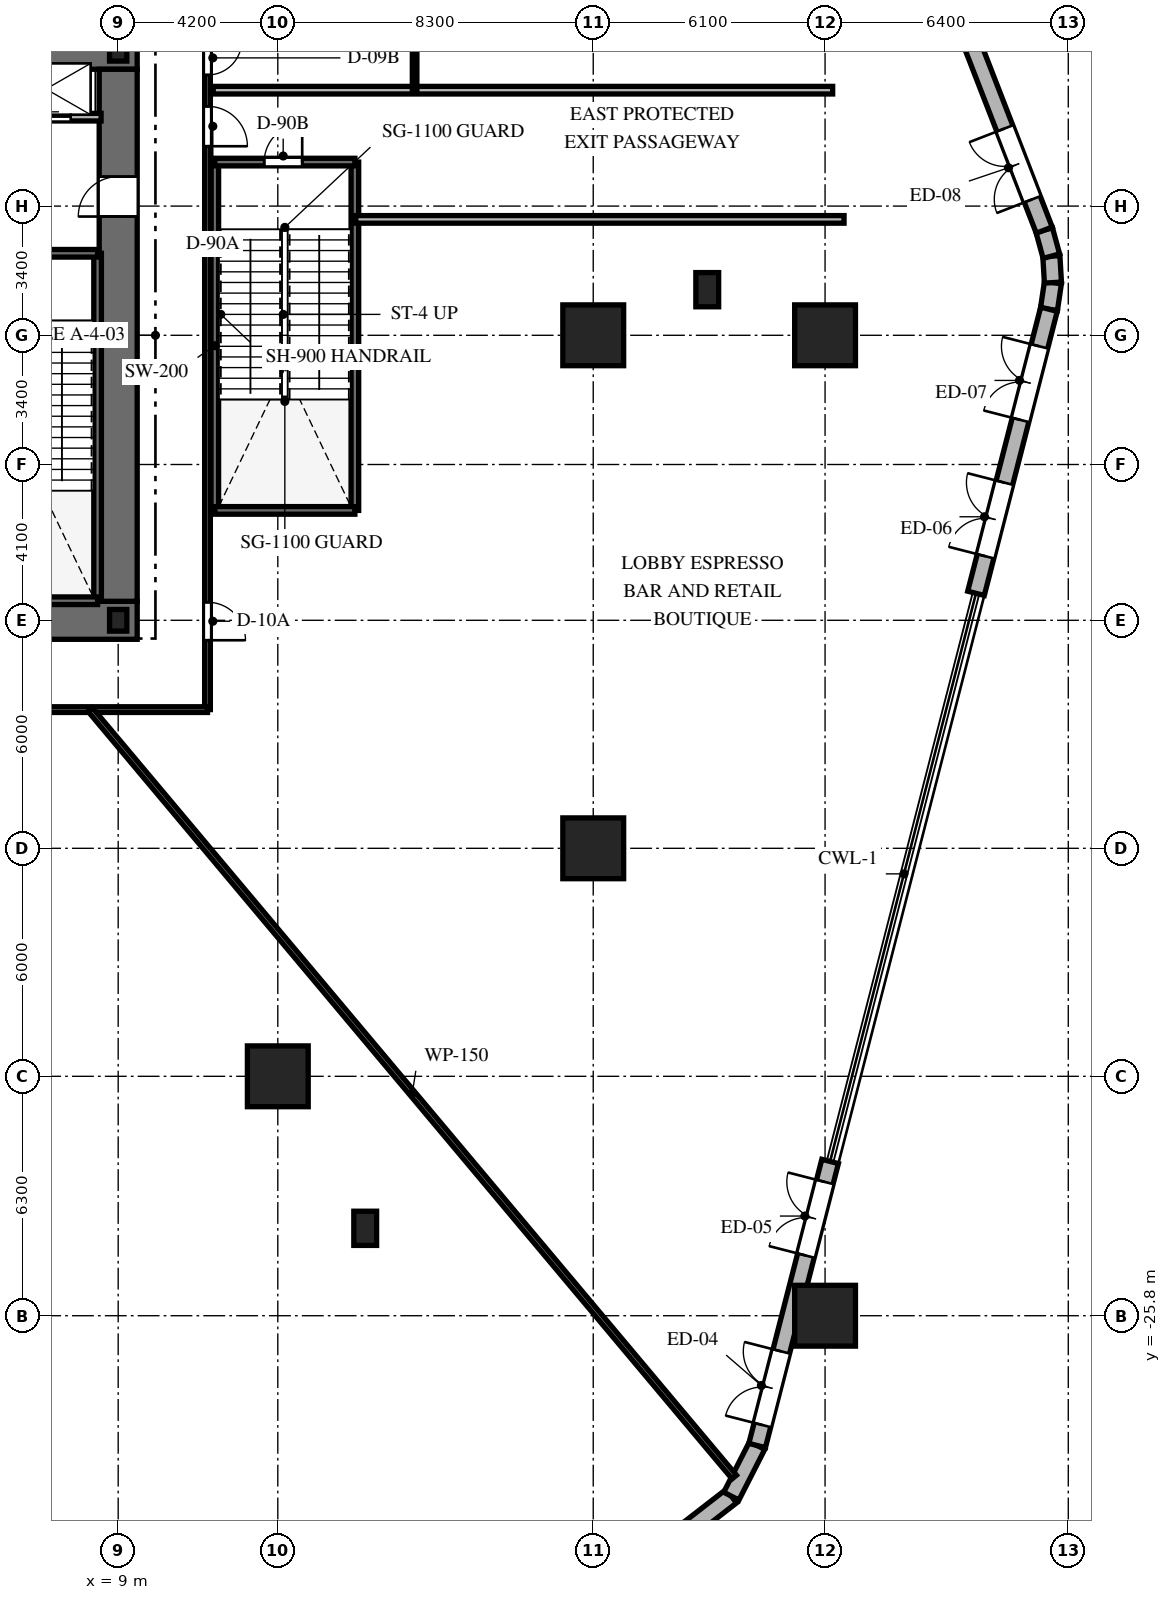
"""IFC4 building model, lengths in metres.
Left out: names, types, materials, properties, quantities, classifications, styles, units other than length and angle.
Written with IfcOpenShell. Run it as: python <this file> out.ifc"""

import sys

from ifc_helpers import new_model, si_unit, direction, frame, frame_2d, origin, origin_2d, place, context, subcontext, project, spatial, rectangle, i_section, extrude, element, fill, save


model = new_model("IFC4")
c1 = context("Model", 3, precision=1e-05, world=origin(), true_north=direction((0.0, 1.0)))
c2 = subcontext(c1, "Body", "Model", "MODEL_VIEW")
j1 = project(units=[si_unit("LENGTHUNIT", "METRE"), si_unit("PLANEANGLEUNIT", "RADIAN")], contexts=[c1])
p1 = place(None, origin())
s1 = spatial("IfcSite", under=j1, at=p1, CompositionType="ELEMENT")
p2 = place(p1, origin())
s2 = spatial("IfcBuilding", under=s1, at=p2, CompositionType="ELEMENT")
p3 = place(p2, origin())
s3 = spatial("IfcBuildingStorey", under=s2, at=p3, CompositionType="ELEMENT", Elevation=0.0)
p4 = place(p3, frame((-9.5, -7.5, 0.0), z_axis=(0.0, 0.0, 1.0), x_axis=(1.0, 0.0, 0.0)))
e1 = element("IfcWall", 1, at=p4, inside=s3, PredefinedType="SHEAR", context=c2, shape_type="SweptSolid", body=[
    extrude(rectangle(XDim=19.0, YDim=1.0, at=frame_2d((9.5, 0.0))), origin(), (0.0, 0.0, 1.0), 6.0),
])
p5 = place(p4, frame((9.55, 0.0, 0.0)))
e2 = element("IfcOpeningElement", 2, at=p5, cuts=e1, PredefinedType="OPENING", context=c2, shape_type="SweptSolid", body=[
    extrude(rectangle(XDim=1.0, YDim=2.15, at=frame_2d((0.5, 1.075))), frame((0.0, 0.51, 0.0), z_axis=(0.0, -1.0, 0.0), x_axis=(1.0, 0.0, 0.0)), (0.0, 0.0, 1.0), 1.02),
])
p6 = place(p3, frame((1.85, 7.5, 0.0), z_axis=(0.0, 0.0, 1.0), x_axis=(1.0, 0.0, 0.0)))
e3 = element("IfcWall", 3, at=p6, inside=s3, PredefinedType="SHEAR", context=c2, shape_type="SweptSolid", body=[
    extrude(rectangle(XDim=7.65, YDim=1.0, at=frame_2d((3.825, 0.0))), origin(), (0.0, 0.0, 1.0), 6.0),
])
p7 = place(p3, frame((9.0, -7.0, 0.0), z_axis=(0.0, 0.0, 1.0), x_axis=(0.0, 1.0, 0.0)))
e4 = element("IfcWall", 4, at=p7, inside=s3, PredefinedType="SHEAR", context=c2, shape_type="SweptSolid", body=[
    extrude(rectangle(XDim=14.0, YDim=1.0, at=frame_2d((7.0, 0.0))), origin(), (0.0, 0.0, 1.0), 6.0),
])
p8 = place(p7, frame((10.125, 0.0, 0.0)))
e5 = element("IfcOpeningElement", 5, at=p8, cuts=e4, PredefinedType="OPENING", context=c2, shape_type="SweptSolid", body=[
    extrude(rectangle(XDim=1.05, YDim=2.15, at=frame_2d((0.525, 1.075))), frame((0.0, 0.51, 0.0), z_axis=(0.0, -1.0, 0.0), x_axis=(1.0, 0.0, 0.0)), (0.0, 0.0, 1.0), 1.02),
])
p9 = place(p3, frame((8.458, -6.985, 0.0), z_axis=(0.0, 0.0, 1.0), x_axis=(0.0, 1.0, 0.0)))
e6 = element("IfcWall", 6, at=p9, inside=s3, PredefinedType="SHEAR", context=c2, shape_type="SweptSolid", body=[
    extrude(rectangle(XDim=9.143, YDim=0.2, at=frame_2d((4.572, 0.0))), origin(), (0.0, 0.0, 1.0), 6.0),
])
p10 = place(p3, frame((4.772, -6.985, 0.0), z_axis=(0.0, 0.0, 1.0), x_axis=(1.0, 0.0, 0.0)))
e7 = element("IfcWall", 7, at=p10, inside=s3, PredefinedType="SHEAR", context=c2, shape_type="SweptSolid", body=[
    extrude(rectangle(XDim=3.686, YDim=0.2, at=frame_2d((1.843, 0.0))), origin(), (0.0, 0.0, 1.0), 6.0),
])
p11 = place(p3, frame((4.772, 2.158, 0.0), z_axis=(0.0, 0.0, 1.0), x_axis=(1.0, 0.0, 0.0)))
e8 = element("IfcWall", 8, at=p11, inside=s3, PredefinedType="SHEAR", context=c2, shape_type="SweptSolid", body=[
    extrude(rectangle(XDim=3.686, YDim=0.2, at=frame_2d((1.843, 0.0))), origin(), (0.0, 0.0, 1.0), 6.0),
])
p12 = place(p11, frame((1.35, 0.0, 0.0)))
e9 = element("IfcOpeningElement", 9, at=p12, cuts=e8, PredefinedType="OPENING", context=c2, shape_type="SweptSolid", body=[
    extrude(rectangle(XDim=1.0, YDim=2.15, at=frame_2d((0.5, 1.075))), frame((0.0, 0.11, 0.0), z_axis=(0.0, -1.0, 0.0), x_axis=(1.0, 0.0, 0.0)), (0.0, 0.0, 1.0), 0.22),
])
for number, where, z_axis, x_axis in (
    (10, (11.542, -4.608, 0.0), (0.0, 0.0, 1.0), (0.0, 1.0, 0.0)),
    (11, (15.228, -4.608, 0.0), (0.0, 0.0, 1.0), (0.0, 1.0, 0.0)),
):
    element("IfcWall", number, at=place(p3, frame(where, z_axis=z_axis, x_axis=x_axis)), inside=s3, PredefinedType="SHEAR", context=c2, shape_type="SweptSolid", body=[
        extrude(rectangle(XDim=9.166, YDim=0.2, at=frame_2d((4.583, 0.0))), origin(), (0.0, 0.0, 1.0), 6.0),
    ])
p13 = place(p3, frame((11.542, -4.608, 0.0), z_axis=(0.0, 0.0, 1.0), x_axis=(1.0, 0.0, 0.0)))
e12 = element("IfcWall", 12, at=p13, inside=s3, PredefinedType="SHEAR", context=c2, shape_type="SweptSolid", body=[
    extrude(rectangle(XDim=3.686, YDim=0.2, at=frame_2d((1.843, 0.0))), origin(), (0.0, 0.0, 1.0), 6.0),
])
p14 = place(p3, frame((11.542, 4.558, 0.0), z_axis=(0.0, 0.0, 1.0), x_axis=(1.0, 0.0, 0.0)))
e13 = element("IfcWall", 13, at=p14, inside=s3, PredefinedType="SHEAR", context=c2, shape_type="SweptSolid", body=[
    extrude(rectangle(XDim=3.686, YDim=0.2, at=frame_2d((1.843, 0.0))), origin(), (0.0, 0.0, 1.0), 6.0),
])
p15 = place(p14, frame((1.3, 0.0, 0.0)))
e14 = element("IfcOpeningElement", 14, at=p15, cuts=e13, PredefinedType="OPENING", context=c2, shape_type="SweptSolid", body=[
    extrude(rectangle(XDim=1.0, YDim=2.15, at=frame_2d((0.5, 1.075))), frame((0.0, 0.11, 0.0), z_axis=(0.0, -1.0, 0.0), x_axis=(1.0, 0.0, 0.0)), (0.0, 0.0, 1.0), 0.22),
])
for number, where, z_axis, x_axis in (
    (15, (9.0, -7.5, 0.0), (0.0, 0.0, 1.0), (1.0, 0.0, 0.0)),
    (16, (9.0, 7.5, 0.0), (0.0, 0.0, 1.0), (1.0, 0.0, 0.0)),
):
    element("IfcColumn", number, at=place(p3, frame(where, z_axis=z_axis, x_axis=x_axis)), inside=s3, PredefinedType="COLUMN", context=c2, shape_type="SweptSolid", body=[
        extrude(i_section(OverallWidth=0.454, OverallDepth=0.569, WebThickness=0.078, FlangeThickness=0.125, at=origin_2d()), origin(), (0.0, 0.0, 1.0), 6.0),
    ])
for number, where, z_axis, x_axis in (
    (17, (21.5, -13.5, 0.0), (0.0, 0.0, 1.0), (1.0, 0.0, 0.0)),
    (18, (21.5, 0.0, 0.0), (0.0, 0.0, 1.0), (1.0, 0.0, 0.0)),
    (19, (13.2, -19.5, 0.0), (0.0, 0.0, 1.0), (1.0, 0.0, 0.0)),
    (20, (27.6, -25.8, 0.0), (0.0, 0.0, 1.0), (1.0, 0.0, 0.0)),
    (21, (27.6, 0.0, 0.0), (0.0, 0.0, 1.0), (1.0, 0.0, 0.0)),
):
    element("IfcColumn", number, at=place(p3, frame(where, z_axis=z_axis, x_axis=x_axis)), inside=s3, PredefinedType="COLUMN", context=c2, shape_type="SweptSolid", body=[
        extrude(rectangle(XDim=1.6, YDim=1.6, at=origin_2d()), origin(), (0.0, 0.0, 1.0), 6.0),
    ])
for number, where, z_axis, x_axis in (
    (22, (15.5, -23.5, 0.0), (0.0, 0.0, 1.0), (1.0, 0.0, 0.0)),
    (23, (24.5, 1.2, 0.0), (0.0, 0.0, 1.0), (1.0, 0.0, 0.0)),
):
    element("IfcColumn", number, at=place(p3, frame(where, z_axis=z_axis, x_axis=x_axis)), inside=s3, PredefinedType="PILASTER", context=c2, shape_type="SweptSolid", body=[
        extrude(rectangle(XDim=0.6, YDim=0.9, at=origin_2d()), origin(), (0.0, 0.0, 1.0), 6.0),
    ])
p16 = place(p3, frame((23.972, -31.449, 0.0), z_axis=(0.0, 0.0, 1.0), x_axis=(0.790147566143, 0.612916653157, 0.0)))
e24 = element("IfcWall", 24, at=p16, inside=s3, PredefinedType="SOLIDWALL", context=c2, shape_type="SweptSolid", body=[
    extrude(rectangle(XDim=1.47, YDim=0.45, at=frame_2d((0.735, 0.0))), origin(), (0.0, 0.0, 1.0), 4.65),
])
p17 = place(p3, frame((25.134, -30.548, 0.0), z_axis=(0.0, 0.0, 1.0), x_axis=(0.45418744744, 0.890906146902, 0.0)))
e25 = element("IfcWall", 25, at=p17, inside=s3, PredefinedType="SOLIDWALL", context=c2, shape_type="SweptSolid", body=[
    extrude(rectangle(XDim=1.495, YDim=0.45, at=frame_2d((0.748, 0.0))), origin(), (0.0, 0.0, 1.0), 4.65),
])
p18 = place(p3, frame((33.492, 0.685, 0.0), z_axis=(0.0, 0.0, 1.0), x_axis=(0.147296976116, 0.98909231158, 0.0)))
e26 = element("IfcWall", 26, at=p18, inside=s3, PredefinedType="SOLIDWALL", context=c2, shape_type="SweptSolid", body=[
    extrude(rectangle(XDim=0.709, YDim=0.45, at=frame_2d((0.355, 0.0))), origin(), (0.0, 0.0, 1.0), 4.65),
])
p19 = place(p3, frame((33.596, 1.387, 0.0), z_axis=(0.0, 0.0, 1.0), x_axis=(-0.059501681244, 0.998228205336, 0.0)))
e27 = element("IfcWall", 27, at=p19, inside=s3, PredefinedType="SOLIDWALL", context=c2, shape_type="SweptSolid", body=[
    extrude(rectangle(XDim=0.698, YDim=0.45, at=frame_2d((0.349, 0.0))), origin(), (0.0, 0.0, 1.0), 4.65),
])
p20 = place(p3, frame((33.555, 2.083, 0.0), z_axis=(0.0, 0.0, 1.0), x_axis=(-0.263379583897, 0.964692279842, 0.0)))
e28 = element("IfcWall", 28, at=p20, inside=s3, PredefinedType="SOLIDWALL", context=c2, shape_type="SweptSolid", body=[
    extrude(rectangle(XDim=0.709, YDim=0.45, at=frame_2d((0.354, 0.0))), origin(), (0.0, 0.0, 1.0), 4.65),
])
p21 = place(p3, frame((25.813, -29.216, 0.0), z_axis=(0.0, 0.0, 1.0), x_axis=(0.248723131147, 0.968574624917, 0.0)))
e29 = element("IfcWall", 29, at=p21, inside=s3, PredefinedType="SOLIDWALL", context=c2, shape_type="SweptSolid", body=[
    extrude(rectangle(XDim=7.718, YDim=0.45, at=frame_2d((3.859, 0.0))), origin(), (0.0, 0.0, 1.0), 4.65),
])
p22 = place(p21, frame((0.557, 0.0, 0.0)))
e30 = element("IfcOpeningElement", 30, at=p22, cuts=e29, PredefinedType="OPENING", context=c2, shape_type="SweptSolid", body=[
    extrude(rectangle(XDim=2.0, YDim=2.4, at=frame_2d((1.0, 1.2))), frame((0.0, 0.235, 0.0), z_axis=(0.0, -1.0, 0.0), x_axis=(1.0, 0.0, 0.0)), (0.0, 0.0, 1.0), 0.47),
])
p23 = place(p21, frame((5.161, 0.0, 0.0)))
e31 = element("IfcOpeningElement", 31, at=p23, cuts=e29, PredefinedType="OPENING", context=c2, shape_type="SweptSolid", body=[
    extrude(rectangle(XDim=2.0, YDim=2.4, at=frame_2d((1.0, 1.2))), frame((0.0, 0.235, 0.0), z_axis=(0.0, -1.0, 0.0), x_axis=(1.0, 0.0, 0.0)), (0.0, 0.0, 1.0), 0.47),
])
p24 = place(p3, frame((31.572, -6.79, 0.0), z_axis=(0.0, 0.0, 1.0), x_axis=(0.248730751762, 0.968572667964, 0.0)))
e32 = element("IfcWall", 32, at=p24, inside=s3, PredefinedType="SOLIDWALL", context=c2, shape_type="SweptSolid", body=[
    extrude(rectangle(XDim=7.718, YDim=0.45, at=frame_2d((3.859, 0.0))), origin(), (0.0, 0.0, 1.0), 4.65),
])
p25 = place(p24, frame((1.007, 0.0, 0.0)))
e33 = element("IfcOpeningElement", 33, at=p25, cuts=e32, PredefinedType="OPENING", context=c2, shape_type="SweptSolid", body=[
    extrude(rectangle(XDim=2.0, YDim=2.4, at=frame_2d((1.0, 1.2))), frame((0.0, 0.235, 0.0), z_axis=(0.0, -1.0, 0.0), x_axis=(1.0, 0.0, 0.0)), (0.0, 0.0, 1.0), 0.47),
])
p26 = place(p24, frame((4.711, 0.0, 0.0)))
e34 = element("IfcOpeningElement", 34, at=p26, cuts=e32, PredefinedType="OPENING", context=c2, shape_type="SweptSolid", body=[
    extrude(rectangle(XDim=2.0, YDim=2.4, at=frame_2d((1.0, 1.2))), frame((0.0, 0.235, 0.0), z_axis=(0.0, -1.0, 0.0), x_axis=(1.0, 0.0, 0.0)), (0.0, 0.0, 1.0), 0.47),
])
p27 = place(p3, frame((33.368, 2.767, 0.0), z_axis=(0.0, 0.0, 1.0), x_axis=(-0.361647043452, 0.932315084058, 0.0)))
e35 = element("IfcWall", 35, at=p27, inside=s3, PredefinedType="SOLIDWALL", context=c2, shape_type="SweptSolid", body=[
    extrude(rectangle(XDim=7.195, YDim=0.45, at=frame_2d((3.598, 0.0))), origin(), (0.0, 0.0, 1.0), 4.65),
])
p28 = place(p27, frame((0.871, 0.0, 0.0)))
e36 = element("IfcOpeningElement", 36, at=p28, cuts=e35, PredefinedType="OPENING", context=c2, shape_type="SweptSolid", body=[
    extrude(rectangle(XDim=2.0, YDim=2.4, at=frame_2d((1.0, 1.2))), frame((0.0, 0.235, 0.0), z_axis=(0.0, -1.0, 0.0), x_axis=(1.0, 0.0, 0.0)), (0.0, 0.0, 1.0), 0.47),
])
p29 = place(p3, frame((4.5, 5.74, 0.0), z_axis=(0.0, 0.0, 1.0), x_axis=(1.0, 0.0, 0.0)))
e37 = element("IfcWall", 37, at=p29, inside=s3, PredefinedType="PARTITIONING", context=c2, shape_type="SweptSolid", body=[
    extrude(rectangle(XDim=4.05, YDim=0.2, at=frame_2d((2.025, 0.0))), origin(), (0.0, 0.0, 1.0), 5.68),
])
p30 = place(p29, frame((0.3, 0.0, 0.0)))
e38 = element("IfcOpeningElement", 38, at=p30, cuts=e37, PredefinedType="OPENING", context=c2, shape_type="SweptSolid", body=[
    extrude(rectangle(XDim=0.85, YDim=2.03, at=frame_2d((0.425, 1.015))), frame((0.0, 0.11, 0.0), z_axis=(0.0, -1.0, 0.0), x_axis=(1.0, 0.0, 0.0)), (0.0, 0.0, 1.0), 0.22),
])
p31 = place(p29, frame((2.15, 0.0, 0.0)))
e39 = element("IfcOpeningElement", 39, at=p31, cuts=e37, PredefinedType="OPENING", context=c2, shape_type="SweptSolid", body=[
    extrude(rectangle(XDim=1.1, YDim=2.2, at=frame_2d((0.55, 1.1))), frame((0.0, 0.11, 0.0), z_axis=(0.0, -1.0, 0.0), x_axis=(1.0, 0.0, 0.0)), (0.0, 0.0, 1.0), 0.22),
])
p32 = place(p3, frame((11.35, 9.85, 0.0), z_axis=(0.0, 0.0, 1.0), x_axis=(0.0, -1.0, 0.0)))
e40 = element("IfcWall", 40, at=p32, inside=s3, PredefinedType="PARTITIONING", context=c2, shape_type="SweptSolid", body=[
    extrude(rectangle(XDim=19.7, YDim=0.15, at=frame_2d((9.85, 0.0))), origin(), (0.0, 0.0, 1.0), 4.722),
])
p33 = place(p32, frame((3.825, 0.0, 0.0)))
e41 = element("IfcOpeningElement", 41, at=p33, cuts=e40, PredefinedType="OPENING", context=c2, shape_type="SweptSolid", body=[
    extrude(rectangle(XDim=1.05, YDim=2.15, at=frame_2d((0.525, 1.075))), frame((0.0, 0.085, 0.0), z_axis=(0.0, -1.0, 0.0), x_axis=(1.0, 0.0, 0.0)), (0.0, 0.0, 1.0), 0.17),
])
p34 = place(p32, frame((2.1, 0.0, 0.0)))
e42 = element("IfcOpeningElement", 42, at=p34, cuts=e40, PredefinedType="OPENING", context=c2, shape_type="SweptSolid", body=[
    extrude(rectangle(XDim=0.9, YDim=2.03, at=frame_2d((0.45, 1.015))), frame((0.0, 0.085, 0.0), z_axis=(0.0, -1.0, 0.0), x_axis=(1.0, 0.0, 0.0)), (0.0, 0.0, 1.0), 0.17),
])
p35 = place(p32, frame((16.875, 0.0, 0.0)))
e43 = element("IfcOpeningElement", 43, at=p35, cuts=e40, PredefinedType="OPENING", context=c2, shape_type="SweptSolid", body=[
    extrude(rectangle(XDim=1.0, YDim=2.03, at=frame_2d((0.5, 1.015))), frame((0.0, 0.085, 0.0), z_axis=(0.0, -1.0, 0.0), x_axis=(1.0, 0.0, 0.0)), (0.0, 0.0, 1.0), 0.17),
])
p36 = place(p3, frame((11.35, -9.85, 0.0), z_axis=(0.0, 0.0, 1.0), x_axis=(-1.0, 0.0, 0.0)))
e44 = element("IfcWall", 44, at=p36, inside=s3, PredefinedType="PARTITIONING", context=c2, shape_type="SweptSolid", body=[
    extrude(rectangle(XDim=22.7, YDim=0.15, at=frame_2d((11.35, 0.0))), origin(), (0.0, 0.0, 1.0), 4.722),
])
p37 = place(p36, frame((14.9, 0.0, 0.0)))
e45 = element("IfcOpeningElement", 45, at=p37, cuts=e44, PredefinedType="OPENING", context=c2, shape_type="SweptSolid", body=[
    extrude(rectangle(XDim=1.0, YDim=2.15, at=frame_2d((0.5, 1.075))), frame((0.0, 0.085, 0.0), z_axis=(0.0, -1.0, 0.0), x_axis=(1.0, 0.0, 0.0)), (0.0, 0.0, 1.0), 0.17),
])
p38 = place(p3, frame((11.5, 6.45, 0.0), z_axis=(0.0, 0.0, 1.0), x_axis=(1.0, 0.0, 0.0)))
e46 = element("IfcWall", 46, at=p38, inside=s3, PredefinedType="PARTITIONING", context=c2, shape_type="SweptSolid", body=[
    extrude(rectangle(XDim=16.3, YDim=0.2, at=frame_2d((8.15, 0.0))), origin(), (0.0, 0.0, 1.0), 4.67),
])
p39 = place(p3, frame((15.25, 3.05, 0.0), z_axis=(0.0, 0.0, 1.0), x_axis=(1.0, 0.0, 0.0)))
e47 = element("IfcWall", 47, at=p39, inside=s3, PredefinedType="PARTITIONING", context=c2, shape_type="SweptSolid", body=[
    extrude(rectangle(XDim=12.85, YDim=0.2, at=frame_2d((6.425, 0.0))), origin(), (0.0, 0.0, 1.0), 4.67),
])
p40 = place(p3, frame((16.8, 6.45, 0.0), z_axis=(0.0, 0.0, 1.0), x_axis=(0.0, 1.0, 0.0)))
e48 = element("IfcWall", 48, at=p40, inside=s3, PredefinedType="PARTITIONING", context=c2, shape_type="SweptSolid", body=[
    extrude(rectangle(XDim=3.4, YDim=0.12, at=frame_2d((1.7, 0.0))), origin(), (0.0, 0.0, 1.0), 5.68),
])
p41 = place(p3, frame((8.265, -9.85, 0.0), z_axis=(0.0, 0.0, 1.0), x_axis=(0.642789548222, -0.766042816491, 0.0)))
e49 = element("IfcWall", 49, at=p41, inside=s3, PredefinedType="PARTITIONING", context=c2, shape_type="SweptSolid", body=[
    extrude(rectangle(XDim=26.363, YDim=0.15, at=frame_2d((13.181, 0.0))), origin(), (0.0, 0.0, 1.0), 4.67),
])
p42 = place(p22, origin())
e50 = element("IfcDoor", 50, at=p42, inside=s3, OperationType="DOUBLE_SWING_LEFT", PredefinedType="DOOR", context=c2, shape_type="SweptSolid", body=[
    extrude(rectangle(XDim=2.0, YDim=2.4, at=frame_2d((1.0, 1.2))), frame((0.0, 0.025, 0.0), z_axis=(0.0, -1.0, 0.0), x_axis=(1.0, 0.0, 0.0)), (0.0, 0.0, 1.0), 0.05),
])
fill(e30, e50)
p43 = place(p23, origin())
e51 = element("IfcDoor", 51, at=p43, inside=s3, OperationType="DOUBLE_SWING_LEFT", PredefinedType="DOOR", context=c2, shape_type="SweptSolid", body=[
    extrude(rectangle(XDim=2.0, YDim=2.4, at=frame_2d((1.0, 1.2))), frame((0.0, 0.025, 0.0), z_axis=(0.0, -1.0, 0.0), x_axis=(1.0, 0.0, 0.0)), (0.0, 0.0, 1.0), 0.05),
])
fill(e31, e51)
p44 = place(p25, origin())
e52 = element("IfcDoor", 52, at=p44, inside=s3, OperationType="DOUBLE_SWING_LEFT", PredefinedType="DOOR", context=c2, shape_type="SweptSolid", body=[
    extrude(rectangle(XDim=2.0, YDim=2.4, at=frame_2d((1.0, 1.2))), frame((0.0, 0.025, 0.0), z_axis=(0.0, -1.0, 0.0), x_axis=(1.0, 0.0, 0.0)), (0.0, 0.0, 1.0), 0.05),
])
fill(e33, e52)
p45 = place(p26, origin())
e53 = element("IfcDoor", 53, at=p45, inside=s3, OperationType="DOUBLE_SWING_LEFT", PredefinedType="DOOR", context=c2, shape_type="SweptSolid", body=[
    extrude(rectangle(XDim=2.0, YDim=2.4, at=frame_2d((1.0, 1.2))), frame((0.0, 0.025, 0.0), z_axis=(0.0, -1.0, 0.0), x_axis=(1.0, 0.0, 0.0)), (0.0, 0.0, 1.0), 0.05),
])
fill(e34, e53)
p46 = place(p28, origin())
e54 = element("IfcDoor", 54, at=p46, inside=s3, OperationType="DOUBLE_SWING_LEFT", PredefinedType="DOOR", context=c2, shape_type="SweptSolid", body=[
    extrude(rectangle(XDim=2.0, YDim=2.4, at=frame_2d((1.0, 1.2))), frame((0.0, 0.025, 0.0), z_axis=(0.0, -1.0, 0.0), x_axis=(1.0, 0.0, 0.0)), (0.0, 0.0, 1.0), 0.05),
])
fill(e36, e54)
p47 = place(p8, origin())
e55 = element("IfcDoor", 55, at=p47, inside=s3, OperationType="SINGLE_SWING_LEFT", PredefinedType="DOOR", context=c2, shape_type="SweptSolid", body=[
    extrude(rectangle(XDim=1.05, YDim=2.15, at=frame_2d((0.525, 1.075))), frame((0.0, 0.025, 0.0), z_axis=(0.0, -1.0, 0.0), x_axis=(1.0, 0.0, 0.0)), (0.0, 0.0, 1.0), 0.05),
])
fill(e5, e55)
p48 = place(p31, origin())
e56 = element("IfcDoor", 56, at=p48, inside=s3, OperationType="SLIDING_TO_RIGHT", PredefinedType="DOOR", context=c2, shape_type="SweptSolid", body=[
    extrude(rectangle(XDim=1.1, YDim=2.2, at=frame_2d((0.55, 1.1))), frame((0.0, 0.025, 0.0), z_axis=(0.0, -1.0, 0.0), x_axis=(1.0, 0.0, 0.0)), (0.0, 0.0, 1.0), 0.05),
])
fill(e39, e56)
p49 = place(p15, origin())
e57 = element("IfcDoor", 57, at=p49, inside=s3, OperationType="SINGLE_SWING_RIGHT", PredefinedType="DOOR", context=c2, shape_type="SweptSolid", body=[
    extrude(rectangle(XDim=1.0, YDim=2.15, at=frame_2d((0.5, 1.075))), frame((0.0, 0.025, 0.0), z_axis=(0.0, -1.0, 0.0), x_axis=(1.0, 0.0, 0.0)), (0.0, 0.0, 1.0), 0.05),
])
fill(e14, e57)
p50 = place(p33, origin())
e58 = element("IfcDoor", 58, at=p50, inside=s3, OperationType="SINGLE_SWING_RIGHT", PredefinedType="DOOR", context=c2, shape_type="SweptSolid", body=[
    extrude(rectangle(XDim=1.05, YDim=2.15, at=frame_2d((0.525, 1.075))), frame((0.0, 0.025, 0.0), z_axis=(0.0, -1.0, 0.0), x_axis=(1.0, 0.0, 0.0)), (0.0, 0.0, 1.0), 0.05),
])
fill(e41, e58)
p51 = place(p34, origin())
e59 = element("IfcDoor", 59, at=p51, inside=s3, OperationType="SINGLE_SWING_LEFT", PredefinedType="DOOR", context=c2, shape_type="SweptSolid", body=[
    extrude(rectangle(XDim=0.9, YDim=2.03, at=frame_2d((0.45, 1.015))), frame((0.0, 0.025, 0.0), z_axis=(0.0, -1.0, 0.0), x_axis=(1.0, 0.0, 0.0)), (0.0, 0.0, 1.0), 0.05),
])
fill(e42, e59)
p52 = place(p35, origin())
e60 = element("IfcDoor", 60, at=p52, inside=s3, OperationType="SINGLE_SWING_RIGHT", PredefinedType="DOOR", context=c2, shape_type="SweptSolid", body=[
    extrude(rectangle(XDim=1.0, YDim=2.03, at=frame_2d((0.5, 1.015))), frame((0.0, 0.025, 0.0), z_axis=(0.0, -1.0, 0.0), x_axis=(1.0, 0.0, 0.0)), (0.0, 0.0, 1.0), 0.05),
])
fill(e43, e60)
save(model, sys.argv[1])
